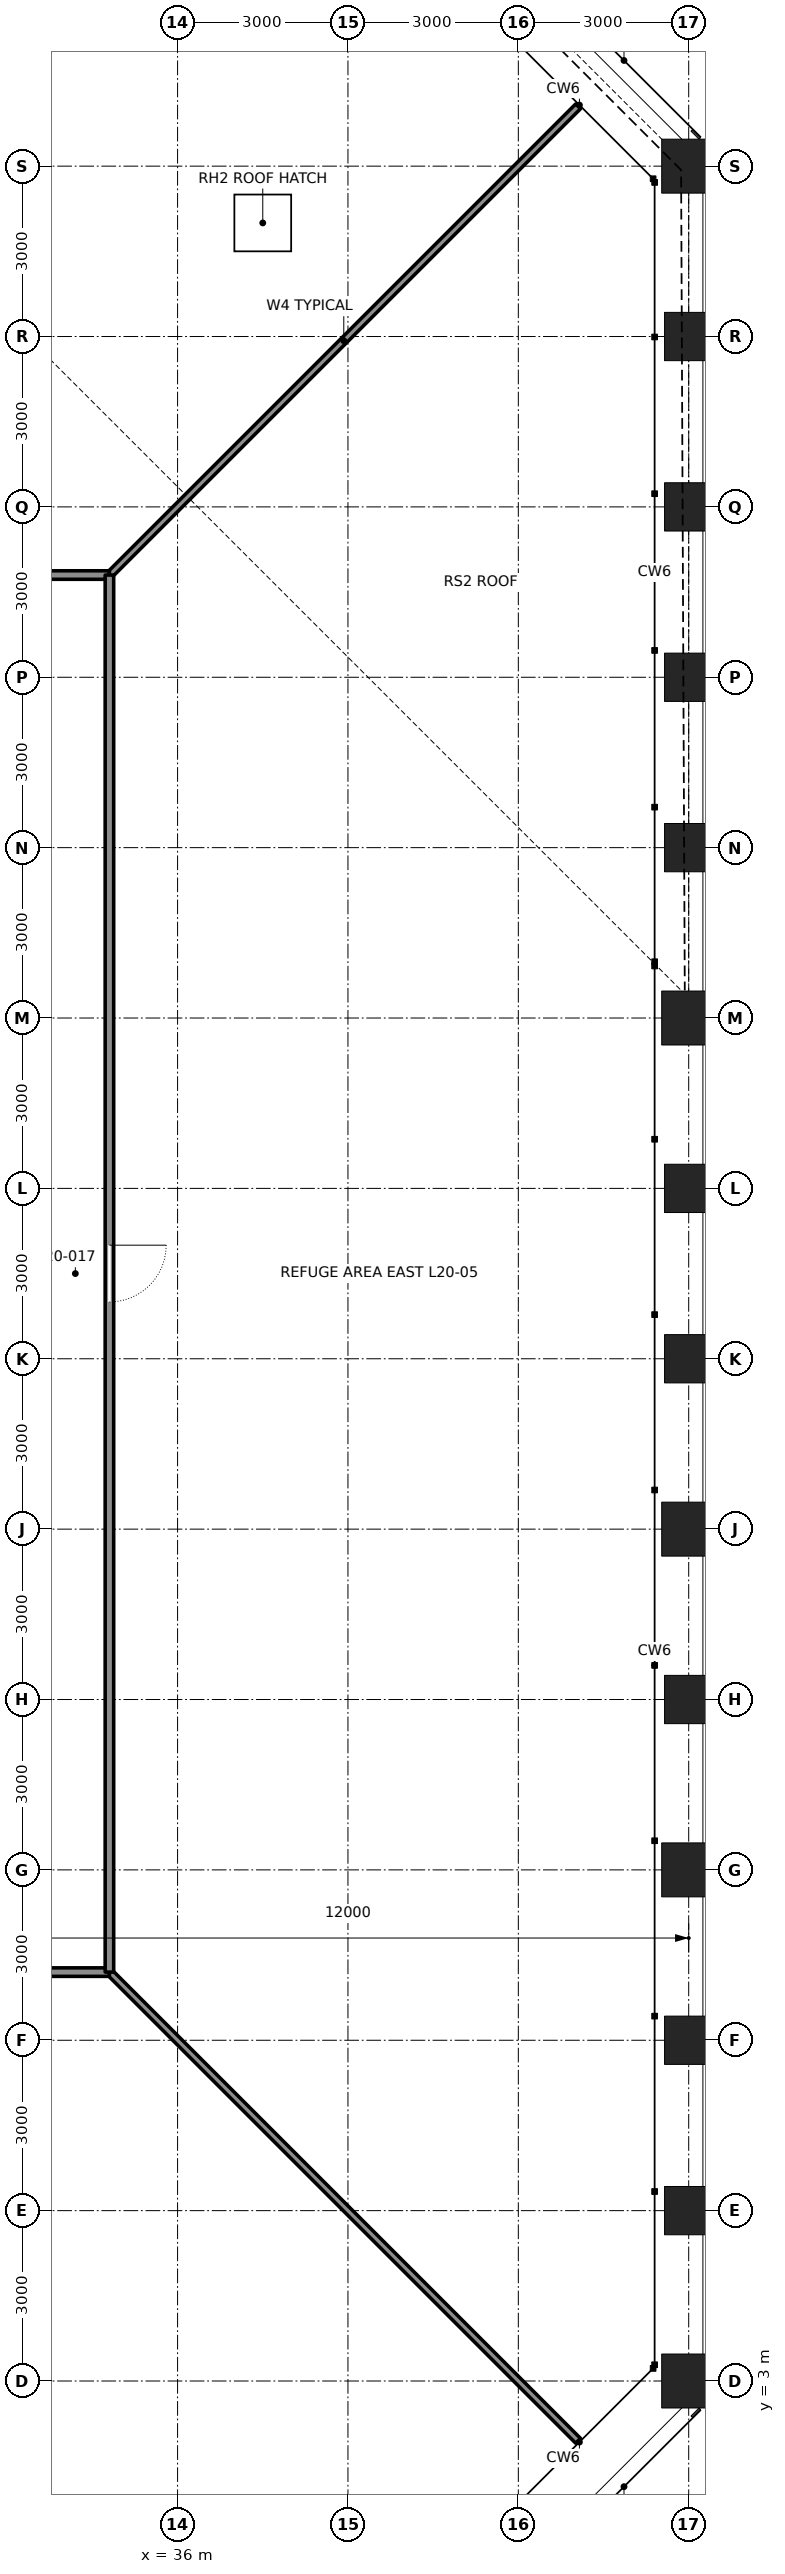
"""IFC4 building model, lengths in metres.
Left out: names, types, materials, properties, quantities, classifications, styles, units other than length and angle.
Written with IfcOpenShell. Run it as: python <this file> out.ifc"""

import sys

from ifc_helpers import new_model, si_unit, direction, frame, frame_2d, origin, origin_2d, place, context, subcontext, project, spatial, rectangle, hollow_rectangle, extrude, element, fill, save


model = new_model("IFC4")
c1 = context("Model", 3, precision=1e-05, world=origin(), true_north=direction((0.0, 1.0)))
c2 = subcontext(c1, "Body", "Model", "MODEL_VIEW")
j1 = project(units=[si_unit("LENGTHUNIT", "METRE"), si_unit("PLANEANGLEUNIT", "RADIAN")], contexts=[c1])
p1 = place(None, origin())
s1 = spatial("IfcSite", under=j1, at=p1, CompositionType="ELEMENT")
p2 = place(p1, origin())
s2 = spatial("IfcBuilding", under=s1, at=p2, CompositionType="ELEMENT")
p3 = place(p2, frame((0.0, 0.0, 96.3)))
s3 = spatial("IfcBuildingStorey", under=s2, at=p3, CompositionType="ELEMENT", Elevation=96.3)
p4 = place(p3, frame((45.0, 3.0, 0.0), z_axis=(0.0, 0.0, 1.0), x_axis=(1.0, 0.0, 0.0)))
e1 = element("IfcColumn", 1, at=p4, inside=s3, PredefinedType="COLUMN", context=c2, shape_type="SweptSolid", body=[
    extrude(hollow_rectangle(XDim=0.95, YDim=0.95, WallThickness=0.095, at=origin_2d()), origin(), (0.0, 0.0, 1.0), 6.0),
])
for number, where, z_axis, x_axis in (
    (2, (45.0, 6.0, 0.0), (0.0, 0.0, 1.0), (1.0, 0.0, 0.0)),
    (3, (45.0, 9.0, 0.0), (0.0, 0.0, 1.0), (1.0, 0.0, 0.0)),
):
    element("IfcColumn", number, at=place(p3, frame(where, z_axis=z_axis, x_axis=x_axis)), inside=s3, PredefinedType="COLUMN", context=c2, shape_type="SweptSolid", body=[
        extrude(hollow_rectangle(XDim=0.85, YDim=0.85, WallThickness=0.085, at=origin_2d()), origin(), (0.0, 0.0, 1.0), 6.0),
    ])
p5 = place(p3, frame((45.0, 12.0, 0.0), z_axis=(0.0, 0.0, 1.0), x_axis=(1.0, 0.0, 0.0)))
e4 = element("IfcColumn", 4, at=p5, inside=s3, PredefinedType="COLUMN", context=c2, shape_type="SweptSolid", body=[
    extrude(hollow_rectangle(XDim=0.95, YDim=0.95, WallThickness=0.11, at=origin_2d()), origin(), (0.0, 0.0, 1.0), 6.0),
])
p6 = place(p3, frame((45.0, 15.0, 0.0), z_axis=(0.0, 0.0, 1.0), x_axis=(1.0, 0.0, 0.0)))
e5 = element("IfcColumn", 5, at=p6, inside=s3, PredefinedType="COLUMN", context=c2, shape_type="SweptSolid", body=[
    extrude(hollow_rectangle(XDim=0.85, YDim=0.85, WallThickness=0.085, at=origin_2d()), origin(), (0.0, 0.0, 1.0), 6.0),
])
p7 = place(p3, frame((45.0, 18.0, 0.0), z_axis=(0.0, 0.0, 1.0), x_axis=(1.0, 0.0, 0.0)))
e6 = element("IfcColumn", 6, at=p7, inside=s3, PredefinedType="COLUMN", context=c2, shape_type="SweptSolid", body=[
    extrude(hollow_rectangle(XDim=0.95, YDim=0.95, WallThickness=0.11, at=origin_2d()), origin(), (0.0, 0.0, 1.0), 6.0),
])
for number, where, z_axis, x_axis in (
    (7, (45.0, 21.0, 0.0), (0.0, 0.0, 1.0), (1.0, 0.0, 0.0)),
    (8, (45.0, 24.0, 0.0), (0.0, 0.0, 1.0), (1.0, 0.0, 0.0)),
):
    element("IfcColumn", number, at=place(p3, frame(where, z_axis=z_axis, x_axis=x_axis)), inside=s3, PredefinedType="COLUMN", context=c2, shape_type="SweptSolid", body=[
        extrude(hollow_rectangle(XDim=0.85, YDim=0.85, WallThickness=0.085, at=origin_2d()), origin(), (0.0, 0.0, 1.0), 6.0),
    ])
p8 = place(p3, frame((45.0, 27.0, 0.0), z_axis=(0.0, 0.0, 1.0), x_axis=(1.0, 0.0, 0.0)))
e9 = element("IfcColumn", 9, at=p8, inside=s3, PredefinedType="COLUMN", context=c2, shape_type="SweptSolid", body=[
    extrude(hollow_rectangle(XDim=0.95, YDim=0.95, WallThickness=0.11, at=origin_2d()), origin(), (0.0, 0.0, 1.0), 6.0),
])
p9 = place(p3, frame((45.0, 30.0, 0.0), z_axis=(0.0, 0.0, 1.0), x_axis=(1.0, 0.0, 0.0)))
e10 = element("IfcColumn", 10, at=p9, inside=s3, PredefinedType="COLUMN", context=c2, shape_type="SweptSolid", body=[
    extrude(hollow_rectangle(XDim=0.85, YDim=0.85, WallThickness=0.085, at=origin_2d()), origin(), (0.0, 0.0, 1.0), 4.149),
])
p10 = place(p3, frame((45.0, 33.0, 0.0), z_axis=(0.0, 0.0, 1.0), x_axis=(1.0, 0.0, 0.0)))
e11 = element("IfcColumn", 11, at=p10, inside=s3, PredefinedType="COLUMN", context=c2, shape_type="SweptSolid", body=[
    extrude(hollow_rectangle(XDim=0.85, YDim=0.85, WallThickness=0.085, at=origin_2d()), origin(), (0.0, 0.0, 1.0), 3.698),
])
p11 = place(p3, frame((45.0, 36.0, 0.0), z_axis=(0.0, 0.0, 1.0), x_axis=(1.0, 0.0, 0.0)))
e12 = element("IfcColumn", 12, at=p11, inside=s3, PredefinedType="COLUMN", context=c2, shape_type="SweptSolid", body=[
    extrude(hollow_rectangle(XDim=0.85, YDim=0.85, WallThickness=0.085, at=origin_2d()), origin(), (0.0, 0.0, 1.0), 3.247),
])
p12 = place(p3, frame((45.0, 39.0, 0.0), z_axis=(0.0, 0.0, 1.0), x_axis=(1.0, 0.0, 0.0)))
e13 = element("IfcColumn", 13, at=p12, inside=s3, PredefinedType="COLUMN", context=c2, shape_type="SweptSolid", body=[
    extrude(hollow_rectangle(XDim=0.85, YDim=0.85, WallThickness=0.085, at=origin_2d()), origin(), (0.0, 0.0, 1.0), 2.796),
])
p13 = place(p3, frame((45.0, 42.0, 0.0), z_axis=(0.0, 0.0, 1.0), x_axis=(1.0, 0.0, 0.0)))
e14 = element("IfcColumn", 14, at=p13, inside=s3, PredefinedType="COLUMN", context=c2, shape_type="SweptSolid", body=[
    extrude(hollow_rectangle(XDim=0.95, YDim=0.95, WallThickness=0.095, at=origin_2d()), origin(), (0.0, 0.0, 1.0), 2.345),
])
for number, where, z_axis, x_axis in (
    (15, (34.8, 34.8, 0.0), (0.0, 0.0, 1.0), (0.707, 0.707, 0.0)),
    (16, (34.8, 10.2, 0.0), (0.0, 0.0, 1.0), (0.707, -0.707, 0.0)),
):
    element("IfcWall", number, at=place(p3, frame(where, z_axis=z_axis, x_axis=x_axis)), inside=s3, PredefinedType="PARTITIONING", context=c2, shape_type="SweptSolid", body=[
        extrude(rectangle(XDim=11.671, YDim=0.12, at=frame_2d((5.836, 0.0))), origin(), (0.0, 0.0, 1.0), 5.84),
    ])
p14 = place(p3, frame((10.2, 10.2, 0.0), z_axis=(0.0, 0.0, 1.0), x_axis=(1.0, 0.0, 0.0)))
e17 = element("IfcWall", 17, at=p14, inside=s3, PredefinedType="PARTITIONING", context=c2, shape_type="SweptSolid", body=[
    extrude(rectangle(XDim=24.6, YDim=0.15, at=frame_2d((12.3, 0.0))), origin(), (0.0, 0.0, 1.0), 5.84),
])
p15 = place(p14, frame((11.8, 0.0, 0.0)))
e18 = element("IfcOpeningElement", 18, at=p15, cuts=e17, PredefinedType="OPENING", context=c2, shape_type="SweptSolid", body=[
    extrude(rectangle(XDim=1.0, YDim=2.4, at=frame_2d((0.5, 1.2))), frame((0.0, 0.085, 0.0), z_axis=(0.0, -1.0, 0.0), x_axis=(1.0, 0.0, 0.0)), (0.0, 0.0, 1.0), 0.17),
])
p16 = place(p3, frame((10.2, 34.8, 0.0), z_axis=(0.0, 0.0, 1.0), x_axis=(1.0, 0.0, 0.0)))
e19 = element("IfcWall", 19, at=p16, inside=s3, PredefinedType="PARTITIONING", context=c2, shape_type="SweptSolid", body=[
    extrude(rectangle(XDim=24.6, YDim=0.15, at=frame_2d((12.3, 0.0))), origin(), (0.0, 0.0, 1.0), 5.84),
])
p17 = place(p16, frame((11.8, 0.0, 0.0)))
e20 = element("IfcOpeningElement", 20, at=p17, cuts=e19, PredefinedType="OPENING", context=c2, shape_type="SweptSolid", body=[
    extrude(rectangle(XDim=1.0, YDim=2.4, at=frame_2d((0.5, 1.2))), frame((0.0, 0.085, 0.0), z_axis=(0.0, -1.0, 0.0), x_axis=(1.0, 0.0, 0.0)), (0.0, 0.0, 1.0), 0.17),
])
p18 = place(p3, frame((34.8, 10.2, 0.0), z_axis=(0.0, 0.0, 1.0), x_axis=(0.0, 1.0, 0.0)))
e21 = element("IfcWall", 21, at=p18, inside=s3, PredefinedType="PARTITIONING", context=c2, shape_type="SweptSolid", body=[
    extrude(rectangle(XDim=24.6, YDim=0.15, at=frame_2d((12.3, 0.0))), origin(), (0.0, 0.0, 1.0), 5.84),
])
p19 = place(p18, frame((11.8, 0.0, 0.0)))
e22 = element("IfcOpeningElement", 22, at=p19, cuts=e21, PredefinedType="OPENING", context=c2, shape_type="SweptSolid", body=[
    extrude(rectangle(XDim=1.0, YDim=2.4, at=frame_2d((0.5, 1.2))), frame((0.0, 0.085, 0.0), z_axis=(0.0, -1.0, 0.0), x_axis=(1.0, 0.0, 0.0)), (0.0, 0.0, 1.0), 0.17),
])
p20 = place(p3, frame((37.5, 41.0, 4.519)))
p21 = place(p20, frame((0.0, 0.0, 0.454)))
e23 = element("IfcDoor", 23, at=p21, inside=s3, OperationType="SINGLE_SWING_LEFT", PredefinedType="TRAPDOOR", context=c2, shape_type="SweptSolid", body=[
    extrude(rectangle(XDim=1.0, YDim=1.0, at=origin_2d()), origin(), (0.0, 0.0, 1.0), 0.05),
])
p22 = place(p19, frame((1.0, 0.0, 0.0), z_axis=(0.0, 0.0, 1.0), x_axis=(-1.0, 0.0, 0.0)))
e24 = element("IfcDoor", 24, at=p22, inside=s3, OperationType="SINGLE_SWING_LEFT", PredefinedType="DOOR", context=c2, shape_type="SweptSolid", body=[
    extrude(rectangle(XDim=1.0, YDim=2.4, at=frame_2d((0.5, 1.2))), frame((0.0, 0.025, 0.0), z_axis=(0.0, -1.0, 0.0), x_axis=(1.0, 0.0, 0.0)), (0.0, 0.0, 1.0), 0.05),
])
fill(e22, e24)
save(model, sys.argv[1])
